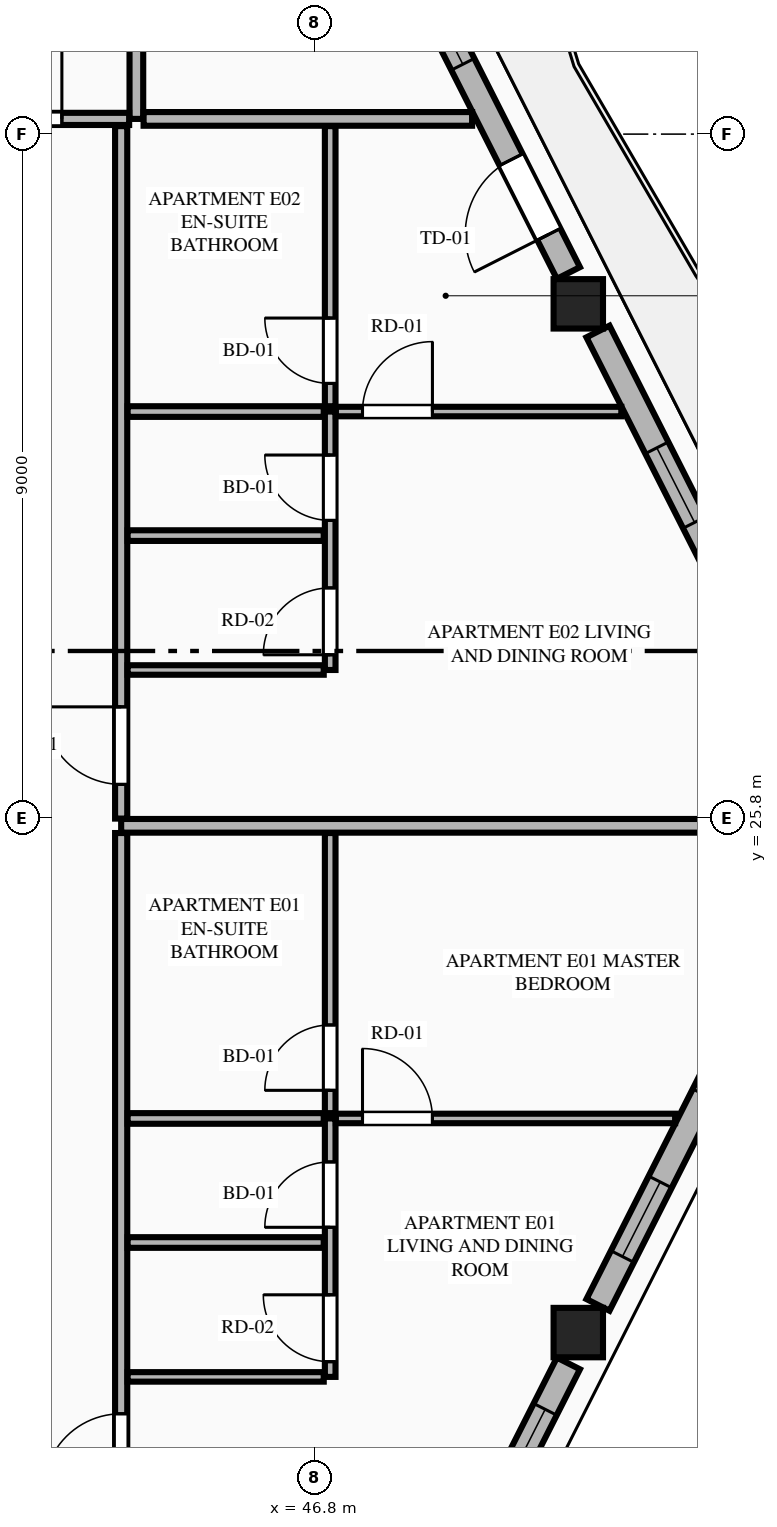
"""IFC4 building model, lengths in metres.
Left out: names, types, materials, properties, quantities, classifications, styles, units other than length and angle.
Written with IfcOpenShell. Run it as: python <this file> out.ifc"""

import sys

from ifc_helpers import new_model, si_unit, direction, frame, frame_2d, origin, origin_2d, place, context, subcontext, project, spatial, rectangle, extrude, element, fill, save


model = new_model("IFC4")
c1 = context("Model", 3, precision=1e-05, world=origin(), true_north=direction((0.0, 1.0)))
c2 = subcontext(c1, "Body", "Model", "MODEL_VIEW")
j1 = project(units=[si_unit("LENGTHUNIT", "METRE"), si_unit("PLANEANGLEUNIT", "RADIAN")], contexts=[c1])
p1 = place(None, origin())
s1 = spatial("IfcSite", under=j1, at=p1, CompositionType="ELEMENT")
p2 = place(p1, origin())
s2 = spatial("IfcBuilding", under=s1, at=p2, CompositionType="ELEMENT")
p3 = place(p2, frame((0.0, 0.0, 287.5)))
s3 = spatial("IfcBuildingStorey", under=s2, at=p3, CompositionType="ELEMENT", Elevation=287.5)
for number, where, z_axis, x_axis in (
    (1, (50.264, 19.033, 0.0), (0.0, 0.0, 1.0), (1.0, 0.0, 0.0)),
    (2, (50.264, 32.567, 0.0), (0.0, 0.0, 1.0), (1.0, 0.0, 0.0)),
):
    element("IfcColumn", number, at=place(p3, frame(where, z_axis=z_axis, x_axis=x_axis)), inside=s3, PredefinedType="COLUMN", context=c2, shape_type="SweptSolid", body=[
        extrude(rectangle(XDim=0.65, YDim=0.65, at=origin_2d()), origin(), (0.0, 0.0, 1.0), 4.0),
    ])
p4 = place(p3, frame((48.002, 14.413, 0.0), z_axis=(0.0, 0.0, 1.0), x_axis=(0.451468341582, 0.892287137949, 0.0)))
e3 = element("IfcWall", 3, at=p4, inside=s3, PredefinedType="STANDARD", context=c2, shape_type="SweptSolid", body=[
    extrude(rectangle(XDim=4.723, YDim=0.34, at=frame_2d((2.361, 0.0))), origin(), (0.0, 0.0, 1.0), 2.99),
])
p5 = place(p4, frame((0.434, 0.0, 0.75)))
e4 = element("IfcOpeningElement", 4, at=p5, cuts=e3, PredefinedType="OPENING", context=c2, shape_type="SweptSolid", body=[
    extrude(rectangle(XDim=1.1, YDim=2.0, at=frame_2d((0.55, 1.0))), frame((0.0, 0.18, 0.0), z_axis=(0.0, -1.0, 0.0), x_axis=(1.0, 0.0, 0.0)), (0.0, 0.0, 1.0), 0.36),
])
p6 = place(p4, frame((2.946, 0.0, 0.75)))
e5 = element("IfcOpeningElement", 5, at=p6, cuts=e3, PredefinedType="OPENING", context=c2, shape_type="SweptSolid", body=[
    extrude(rectangle(XDim=1.1, YDim=2.0, at=frame_2d((0.55, 1.0))), frame((0.0, 0.18, 0.0), z_axis=(0.0, -1.0, 0.0), x_axis=(1.0, 0.0, 0.0)), (0.0, 0.0, 1.0), 0.36),
])
p7 = place(p3, frame((50.523, 19.397, 0.0), z_axis=(0.0, 0.0, 1.0), x_axis=(0.45147697324, 0.892282770558, 0.0)))
e6 = element("IfcWall", 6, at=p7, inside=s3, PredefinedType="STANDARD", context=c2, shape_type="SweptSolid", body=[
    extrude(rectangle(XDim=4.53, YDim=0.34, at=frame_2d((2.265, 0.0))), origin(), (0.0, 0.0, 1.0), 2.99),
])
p8 = place(p7, frame((0.713, 0.0, 0.75)))
e7 = element("IfcOpeningElement", 7, at=p8, cuts=e6, PredefinedType="OPENING", context=c2, shape_type="SweptSolid", body=[
    extrude(rectangle(XDim=1.1, YDim=2.0, at=frame_2d((0.55, 1.0))), frame((0.0, 0.18, 0.0), z_axis=(0.0, -1.0, 0.0), x_axis=(1.0, 0.0, 0.0)), (0.0, 0.0, 1.0), 0.36),
])
p9 = place(p7, frame((3.098, 0.0, 0.75)))
e8 = element("IfcOpeningElement", 8, at=p9, cuts=e6, PredefinedType="OPENING", context=c2, shape_type="SweptSolid", body=[
    extrude(rectangle(XDim=1.1, YDim=2.0, at=frame_2d((0.55, 1.0))), frame((0.0, 0.18, 0.0), z_axis=(0.0, -1.0, 0.0), x_axis=(1.0, 0.0, 0.0)), (0.0, 0.0, 1.0), 0.36),
])
p10 = place(p3, frame((52.568, 28.161, 0.0), z_axis=(0.0, 0.0, 1.0), x_axis=(-0.45147697324, 0.892282770558, 0.0)))
e9 = element("IfcWall", 9, at=p10, inside=s3, PredefinedType="STANDARD", context=c2, shape_type="SweptSolid", body=[
    extrude(rectangle(XDim=4.53, YDim=0.34, at=frame_2d((2.265, 0.0))), origin(), (0.0, 0.0, 1.0), 2.99),
])
p11 = place(p10, frame((1.715, 0.0, 0.75)))
e10 = element("IfcOpeningElement", 10, at=p11, cuts=e9, PredefinedType="OPENING", context=c2, shape_type="SweptSolid", body=[
    extrude(rectangle(XDim=1.1, YDim=2.0, at=frame_2d((0.55, 1.0))), frame((0.0, 0.18, 0.0), z_axis=(0.0, -1.0, 0.0), x_axis=(1.0, 0.0, 0.0)), (0.0, 0.0, 1.0), 0.36),
])
p12 = place(p3, frame((50.134, 32.973, 0.0), z_axis=(0.0, 0.0, 1.0), x_axis=(-0.451447516904, 0.892297674255, 0.0)))
e11 = element("IfcWall", 11, at=p12, inside=s3, PredefinedType="STANDARD", context=c2, shape_type="SweptSolid", body=[
    extrude(rectangle(XDim=4.723, YDim=0.34, at=frame_2d((2.361, 0.0))), origin(), (0.0, 0.0, 1.0), 2.99),
])
p13 = place(p12, frame((0.57, 0.0, 0.0)))
e12 = element("IfcOpeningElement", 12, at=p13, cuts=e11, PredefinedType="OPENING", context=c2, shape_type="SweptSolid", body=[
    extrude(rectangle(XDim=1.1, YDim=2.25, at=frame_2d((0.55, 1.125))), frame((0.0, 0.18, 0.0), z_axis=(0.0, -1.0, 0.0), x_axis=(1.0, 0.0, 0.0)), (0.0, 0.0, 1.0), 0.36),
])
p14 = place(p12, frame((3.077, 0.0, 0.75)))
e13 = element("IfcOpeningElement", 13, at=p14, cuts=e11, PredefinedType="OPENING", context=c2, shape_type="SweptSolid", body=[
    extrude(rectangle(XDim=1.1, YDim=2.0, at=frame_2d((0.55, 1.0))), frame((0.0, 0.18, 0.0), z_axis=(0.0, -1.0, 0.0), x_axis=(1.0, 0.0, 0.0)), (0.0, 0.0, 1.0), 0.36),
])
p15 = place(p3, frame((44.45, 35.0, 0.0), z_axis=(0.0, 0.0, 1.0), x_axis=(0.0, 1.0, 0.0)))
e14 = element("IfcWall", 14, at=p15, inside=s3, PredefinedType="PARTITIONING", context=c2, shape_type="SweptSolid", body=[
    extrude(rectangle(XDim=8.481, YDim=0.18, at=frame_2d((4.24, 0.0))), origin(), (0.0, 0.0, 1.0), 3.8),
])
p16 = place(p3, frame((29.241, 35.0, 0.0), z_axis=(0.0, 0.0, 1.0), x_axis=(1.0, 0.0, 0.0)))
e15 = element("IfcWall", 15, at=p16, inside=s3, PredefinedType="PARTITIONING", context=c2, shape_type="SweptSolid", body=[
    extrude(rectangle(XDim=15.114, YDim=0.16, at=frame_2d((7.557, 0.0))), origin(), (0.0, 0.0, 1.0), 3.8),
])
p17 = place(p16, frame((13.209, 0.0, 0.0)))
e16 = element("IfcOpeningElement", 16, at=p17, cuts=e15, PredefinedType="OPENING", context=c2, shape_type="SweptSolid", body=[
    extrude(rectangle(XDim=1.02, YDim=2.25, at=frame_2d((0.51, 1.125))), frame((0.0, 0.09, 0.0), z_axis=(0.0, -1.0, 0.0), x_axis=(1.0, 0.0, 0.0)), (0.0, 0.0, 1.0), 0.18),
])
p18 = place(p3, frame((44.545, 35.0, 0.0), z_axis=(0.0, 0.0, 1.0), x_axis=(1.0, 0.0, 0.0)))
e17 = element("IfcWall", 17, at=p18, inside=s3, PredefinedType="PARTITIONING", context=c2, shape_type="SweptSolid", body=[
    extrude(rectangle(XDim=4.322, YDim=0.18, at=frame_2d((2.161, 0.0))), origin(), (0.0, 0.0, 1.0), 3.8),
])
p19 = place(p3, frame((44.25, 16.495, 0.0), z_axis=(0.0, 0.0, 1.0), x_axis=(0.0, 1.0, 0.0)))
e18 = element("IfcWall", 18, at=p19, inside=s3, PredefinedType="PARTITIONING", context=c2, shape_type="SweptSolid", body=[
    extrude(rectangle(XDim=9.11, YDim=0.16, at=frame_2d((4.555, 0.0))), origin(), (0.0, 0.0, 1.0), 3.487),
])
p20 = place(p19, frame((0.45, 0.0, 0.0)))
e19 = element("IfcOpeningElement", 19, at=p20, cuts=e18, PredefinedType="OPENING", context=c2, shape_type="SweptSolid", body=[
    extrude(rectangle(XDim=1.02, YDim=2.25, at=frame_2d((0.51, 1.125))), frame((0.0, 0.09, 0.0), z_axis=(0.0, -1.0, 0.0), x_axis=(1.0, 0.0, 0.0)), (0.0, 0.0, 1.0), 0.18),
])
p21 = place(p3, frame((44.335, 18.45, 0.0), z_axis=(0.0, 0.0, 1.0), x_axis=(1.0, 0.0, 0.0)))
e20 = element("IfcWall", 20, at=p21, inside=s3, PredefinedType="PARTITIONING", context=c2, shape_type="SweptSolid", body=[
    extrude(rectangle(XDim=2.58, YDim=0.125, at=frame_2d((1.29, 0.0))), origin(), (0.0, 0.0, 1.0), 3.8),
])
p22 = place(p3, frame((47.0, 18.45, 0.0), z_axis=(0.0, 0.0, 1.0), x_axis=(0.0, 1.0, 0.0)))
e21 = element("IfcWall", 21, at=p22, inside=s3, PredefinedType="PLUMBINGWALL", context=c2, shape_type="SweptSolid", body=[
    extrude(rectangle(XDim=3.4, YDim=0.14, at=frame_2d((1.7, 0.0))), origin(), (0.0, 0.0, 1.0), 3.8),
])
p23 = place(p22, frame((0.2, 0.0, 0.0)))
e22 = element("IfcOpeningElement", 22, at=p23, cuts=e21, PredefinedType="OPENING", context=c2, shape_type="SweptSolid", body=[
    extrude(rectangle(XDim=0.88, YDim=2.15, at=frame_2d((0.44, 1.075))), frame((0.0, 0.08, 0.0), z_axis=(0.0, -1.0, 0.0), x_axis=(1.0, 0.0, 0.0)), (0.0, 0.0, 1.0), 0.16),
])
p24 = place(p22, frame((1.968, 0.0, 0.0)))
e23 = element("IfcOpeningElement", 23, at=p24, cuts=e21, PredefinedType="OPENING", context=c2, shape_type="SweptSolid", body=[
    extrude(rectangle(XDim=0.86, YDim=2.1, at=frame_2d((0.43, 1.05))), frame((0.0, 0.08, 0.0), z_axis=(0.0, -1.0, 0.0), x_axis=(1.0, 0.0, 0.0)), (0.0, 0.0, 1.0), 0.16),
])
p25 = place(p3, frame((47.0, 21.92, 0.0), z_axis=(0.0, 0.0, 1.0), x_axis=(0.0, 1.0, 0.0)))
e24 = element("IfcWall", 24, at=p25, inside=s3, PredefinedType="PLUMBINGWALL", context=c2, shape_type="SweptSolid", body=[
    extrude(rectangle(XDim=3.685, YDim=0.14, at=frame_2d((1.843, 0.0))), origin(), (0.0, 0.0, 1.0), 3.8),
])
p26 = place(p25, frame((0.3, 0.0, 0.0)))
e25 = element("IfcOpeningElement", 25, at=p26, cuts=e24, PredefinedType="OPENING", context=c2, shape_type="SweptSolid", body=[
    extrude(rectangle(XDim=0.86, YDim=2.1, at=frame_2d((0.43, 1.05))), frame((0.0, 0.08, 0.0), z_axis=(0.0, -1.0, 0.0), x_axis=(1.0, 0.0, 0.0)), (0.0, 0.0, 1.0), 0.16),
])
p27 = place(p3, frame((44.335, 21.85, 0.0), z_axis=(0.0, 0.0, 1.0), x_axis=(1.0, 0.0, 0.0)))
e26 = element("IfcWall", 26, at=p27, inside=s3, PredefinedType="PLUMBINGWALL", context=c2, shape_type="SweptSolid", body=[
    extrude(rectangle(XDim=2.58, YDim=0.14, at=frame_2d((1.29, 0.0))), origin(), (0.0, 0.0, 1.0), 3.8),
])
p28 = place(p3, frame((47.075, 21.85, 0.0), z_axis=(0.0, 0.0, 1.0), x_axis=(1.0, 0.0, 0.0)))
e27 = element("IfcWall", 27, at=p28, inside=s3, PredefinedType="PARTITIONING", context=c2, shape_type="SweptSolid", body=[
    extrude(rectangle(XDim=4.463, YDim=0.125, at=frame_2d((2.231, 0.0))), origin(), (0.0, 0.0, 1.0), 3.8),
])
p29 = place(p28, frame((0.35, 0.0, 0.0)))
e28 = element("IfcOpeningElement", 28, at=p29, cuts=e27, PredefinedType="OPENING", context=c2, shape_type="SweptSolid", body=[
    extrude(rectangle(XDim=0.92, YDim=2.15, at=frame_2d((0.46, 1.075))), frame((0.0, 0.073, 0.0), z_axis=(0.0, -1.0, 0.0), x_axis=(1.0, 0.0, 0.0)), (0.0, 0.0, 1.0), 0.145),
])
p30 = place(p3, frame((44.335, 20.218, 0.0), z_axis=(0.0, 0.0, 1.0), x_axis=(1.0, 0.0, 0.0)))
e29 = element("IfcWall", 29, at=p30, inside=s3, PredefinedType="PLUMBINGWALL", context=c2, shape_type="SweptSolid", body=[
    extrude(rectangle(XDim=2.58, YDim=0.14, at=frame_2d((1.29, 0.0))), origin(), (0.0, 0.0, 1.0), 3.8),
])
p31 = place(p3, frame((44.25, 25.7, 0.0), z_axis=(0.0, 0.0, 1.0), x_axis=(1.0, 0.0, 0.0)))
e30 = element("IfcWall", 30, at=p31, inside=s3, PredefinedType="PARTITIONING", context=c2, shape_type="SweptSolid", body=[
    extrude(rectangle(XDim=8.898, YDim=0.18, at=frame_2d((4.449, 0.0))), origin(), (0.0, 0.0, 1.0), 3.8),
])
p32 = place(p3, frame((44.25, 25.795, 0.0), z_axis=(0.0, 0.0, 1.0), x_axis=(0.0, 1.0, 0.0)))
e31 = element("IfcWall", 31, at=p32, inside=s3, PredefinedType="PARTITIONING", context=c2, shape_type="SweptSolid", body=[
    extrude(rectangle(XDim=9.11, YDim=0.16, at=frame_2d((4.555, 0.0))), origin(), (0.0, 0.0, 1.0), 3.487),
])
p33 = place(p32, frame((0.45, 0.0, 0.0)))
e32 = element("IfcOpeningElement", 32, at=p33, cuts=e31, PredefinedType="OPENING", context=c2, shape_type="SweptSolid", body=[
    extrude(rectangle(XDim=1.02, YDim=2.25, at=frame_2d((0.51, 1.125))), frame((0.0, 0.09, 0.0), z_axis=(0.0, -1.0, 0.0), x_axis=(1.0, 0.0, 0.0)), (0.0, 0.0, 1.0), 0.18),
])
p34 = place(p3, frame((44.335, 27.75, 0.0), z_axis=(0.0, 0.0, 1.0), x_axis=(1.0, 0.0, 0.0)))
e33 = element("IfcWall", 33, at=p34, inside=s3, PredefinedType="PARTITIONING", context=c2, shape_type="SweptSolid", body=[
    extrude(rectangle(XDim=2.58, YDim=0.125, at=frame_2d((1.29, 0.0))), origin(), (0.0, 0.0, 1.0), 3.257),
])
p35 = place(p3, frame((47.0, 27.75, 0.0), z_axis=(0.0, 0.0, 1.0), x_axis=(0.0, 1.0, 0.0)))
e34 = element("IfcWall", 34, at=p35, inside=s3, PredefinedType="PLUMBINGWALL", context=c2, shape_type="SweptSolid", body=[
    extrude(rectangle(XDim=3.4, YDim=0.14, at=frame_2d((1.7, 0.0))), origin(), (0.0, 0.0, 1.0), 3.8),
])
p36 = place(p35, frame((0.2, 0.0, 0.0)))
e35 = element("IfcOpeningElement", 35, at=p36, cuts=e34, PredefinedType="OPENING", context=c2, shape_type="SweptSolid", body=[
    extrude(rectangle(XDim=0.88, YDim=2.15, at=frame_2d((0.44, 1.075))), frame((0.0, 0.08, 0.0), z_axis=(0.0, -1.0, 0.0), x_axis=(1.0, 0.0, 0.0)), (0.0, 0.0, 1.0), 0.16),
])
p37 = place(p35, frame((1.968, 0.0, 0.0)))
e36 = element("IfcOpeningElement", 36, at=p37, cuts=e34, PredefinedType="OPENING", context=c2, shape_type="SweptSolid", body=[
    extrude(rectangle(XDim=0.86, YDim=2.1, at=frame_2d((0.43, 1.05))), frame((0.0, 0.08, 0.0), z_axis=(0.0, -1.0, 0.0), x_axis=(1.0, 0.0, 0.0)), (0.0, 0.0, 1.0), 0.16),
])
p38 = place(p3, frame((47.0, 31.22, 0.0), z_axis=(0.0, 0.0, 1.0), x_axis=(0.0, 1.0, 0.0)))
e37 = element("IfcWall", 37, at=p38, inside=s3, PredefinedType="PLUMBINGWALL", context=c2, shape_type="SweptSolid", body=[
    extrude(rectangle(XDim=3.685, YDim=0.14, at=frame_2d((1.843, 0.0))), origin(), (0.0, 0.0, 1.0), 3.8),
])
p39 = place(p38, frame((0.3, 0.0, 0.0)))
e38 = element("IfcOpeningElement", 38, at=p39, cuts=e37, PredefinedType="OPENING", context=c2, shape_type="SweptSolid", body=[
    extrude(rectangle(XDim=0.86, YDim=2.1, at=frame_2d((0.43, 1.05))), frame((0.0, 0.08, 0.0), z_axis=(0.0, -1.0, 0.0), x_axis=(1.0, 0.0, 0.0)), (0.0, 0.0, 1.0), 0.16),
])
p40 = place(p3, frame((44.335, 31.15, 0.0), z_axis=(0.0, 0.0, 1.0), x_axis=(1.0, 0.0, 0.0)))
e39 = element("IfcWall", 39, at=p40, inside=s3, PredefinedType="PLUMBINGWALL", context=c2, shape_type="SweptSolid", body=[
    extrude(rectangle(XDim=2.58, YDim=0.14, at=frame_2d((1.29, 0.0))), origin(), (0.0, 0.0, 1.0), 3.8),
])
p41 = place(p3, frame((47.075, 31.15, 0.0), z_axis=(0.0, 0.0, 1.0), x_axis=(1.0, 0.0, 0.0)))
e40 = element("IfcWall", 40, at=p41, inside=s3, PredefinedType="PARTITIONING", context=c2, shape_type="SweptSolid", body=[
    extrude(rectangle(XDim=3.755, YDim=0.125, at=frame_2d((1.877, 0.0))), origin(), (0.0, 0.0, 1.0), 3.8),
])
p42 = place(p41, frame((0.35, 0.0, 0.0)))
e41 = element("IfcOpeningElement", 41, at=p42, cuts=e40, PredefinedType="OPENING", context=c2, shape_type="SweptSolid", body=[
    extrude(rectangle(XDim=0.92, YDim=2.15, at=frame_2d((0.46, 1.075))), frame((0.0, 0.073, 0.0), z_axis=(0.0, -1.0, 0.0), x_axis=(1.0, 0.0, 0.0)), (0.0, 0.0, 1.0), 0.145),
])
p43 = place(p3, frame((44.335, 29.518, 0.0), z_axis=(0.0, 0.0, 1.0), x_axis=(1.0, 0.0, 0.0)))
e42 = element("IfcWall", 42, at=p43, inside=s3, PredefinedType="PLUMBINGWALL", context=c2, shape_type="SweptSolid", body=[
    extrude(rectangle(XDim=2.58, YDim=0.14, at=frame_2d((1.29, 0.0))), origin(), (0.0, 0.0, 1.0), 3.8),
])
p44 = place(p8, origin())
e43 = element("IfcWindow", 43, at=p44, inside=s3, PartitioningType="SINGLE_PANEL", PredefinedType="WINDOW", context=c2, shape_type="SweptSolid", body=[
    extrude(rectangle(XDim=1.1, YDim=2.0, at=frame_2d((0.55, 1.0))), frame((0.0, 0.03, 0.0), z_axis=(0.0, -1.0, 0.0), x_axis=(1.0, 0.0, 0.0)), (0.0, 0.0, 1.0), 0.06),
])
fill(e7, e43)
p45 = place(p11, origin())
e44 = element("IfcWindow", 44, at=p45, inside=s3, PartitioningType="SINGLE_PANEL", PredefinedType="WINDOW", context=c2, shape_type="SweptSolid", body=[
    extrude(rectangle(XDim=1.1, YDim=2.0, at=frame_2d((0.55, 1.0))), frame((0.0, 0.03, 0.0), z_axis=(0.0, -1.0, 0.0), x_axis=(1.0, 0.0, 0.0)), (0.0, 0.0, 1.0), 0.06),
])
fill(e10, e44)
p46 = place(p13, origin())
e45 = element("IfcDoor", 45, at=p46, inside=s3, OperationType="SINGLE_SWING_LEFT", PredefinedType="DOOR", context=c2, shape_type="SweptSolid", body=[
    extrude(rectangle(XDim=1.1, YDim=2.25, at=frame_2d((0.55, 1.125))), frame((0.0, 0.025, 0.0), z_axis=(0.0, -1.0, 0.0), x_axis=(1.0, 0.0, 0.0)), (0.0, 0.0, 1.0), 0.05),
])
fill(e12, e45)
p47 = place(p17, origin())
e46 = element("IfcDoor", 46, at=p47, inside=s3, OperationType="SINGLE_SWING_RIGHT", PredefinedType="DOOR", context=c2, shape_type="SweptSolid", body=[
    extrude(rectangle(XDim=1.02, YDim=2.25, at=frame_2d((0.51, 1.125))), frame((0.0, 0.025, 0.0), z_axis=(0.0, -1.0, 0.0), x_axis=(1.0, 0.0, 0.0)), (0.0, 0.0, 1.0), 0.05),
])
fill(e16, e46)
p48 = place(p23, origin())
e47 = element("IfcDoor", 47, at=p48, inside=s3, OperationType="SINGLE_SWING_RIGHT", PredefinedType="DOOR", context=c2, shape_type="SweptSolid", body=[
    extrude(rectangle(XDim=0.88, YDim=2.15, at=frame_2d((0.44, 1.075))), frame((0.0, 0.025, 0.0), z_axis=(0.0, -1.0, 0.0), x_axis=(1.0, 0.0, 0.0)), (0.0, 0.0, 1.0), 0.05),
])
fill(e22, e47)
p49 = place(p24, origin())
e48 = element("IfcDoor", 48, at=p49, inside=s3, OperationType="SINGLE_SWING_LEFT", PredefinedType="DOOR", context=c2, shape_type="SweptSolid", body=[
    extrude(rectangle(XDim=0.86, YDim=2.1, at=frame_2d((0.43, 1.05))), frame((0.0, 0.025, 0.0), z_axis=(0.0, -1.0, 0.0), x_axis=(1.0, 0.0, 0.0)), (0.0, 0.0, 1.0), 0.05),
])
fill(e23, e48)
p50 = place(p26, origin())
e49 = element("IfcDoor", 49, at=p50, inside=s3, OperationType="SINGLE_SWING_LEFT", PredefinedType="DOOR", context=c2, shape_type="SweptSolid", body=[
    extrude(rectangle(XDim=0.86, YDim=2.1, at=frame_2d((0.43, 1.05))), frame((0.0, 0.025, 0.0), z_axis=(0.0, -1.0, 0.0), x_axis=(1.0, 0.0, 0.0)), (0.0, 0.0, 1.0), 0.05),
])
fill(e25, e49)
p51 = place(p20, origin())
e50 = element("IfcDoor", 50, at=p51, inside=s3, OperationType="SINGLE_SWING_LEFT", PredefinedType="DOOR", context=c2, shape_type="SweptSolid", body=[
    extrude(rectangle(XDim=1.02, YDim=2.25, at=frame_2d((0.51, 1.125))), frame((0.0, 0.025, 0.0), z_axis=(0.0, -1.0, 0.0), x_axis=(1.0, 0.0, 0.0)), (0.0, 0.0, 1.0), 0.05),
])
fill(e19, e50)
p52 = place(p29, origin())
e51 = element("IfcDoor", 51, at=p52, inside=s3, OperationType="SINGLE_SWING_LEFT", PredefinedType="DOOR", context=c2, shape_type="SweptSolid", body=[
    extrude(rectangle(XDim=0.92, YDim=2.15, at=frame_2d((0.46, 1.075))), frame((0.0, 0.025, 0.0), z_axis=(0.0, -1.0, 0.0), x_axis=(1.0, 0.0, 0.0)), (0.0, 0.0, 1.0), 0.05),
])
fill(e28, e51)
p53 = place(p36, origin())
e52 = element("IfcDoor", 52, at=p53, inside=s3, OperationType="SINGLE_SWING_LEFT", PredefinedType="DOOR", context=c2, shape_type="SweptSolid", body=[
    extrude(rectangle(XDim=0.88, YDim=2.15, at=frame_2d((0.44, 1.075))), frame((0.0, 0.025, 0.0), z_axis=(0.0, -1.0, 0.0), x_axis=(1.0, 0.0, 0.0)), (0.0, 0.0, 1.0), 0.05),
])
fill(e35, e52)
p54 = place(p37, origin())
e53 = element("IfcDoor", 53, at=p54, inside=s3, OperationType="SINGLE_SWING_RIGHT", PredefinedType="DOOR", context=c2, shape_type="SweptSolid", body=[
    extrude(rectangle(XDim=0.86, YDim=2.1, at=frame_2d((0.43, 1.05))), frame((0.0, 0.025, 0.0), z_axis=(0.0, -1.0, 0.0), x_axis=(1.0, 0.0, 0.0)), (0.0, 0.0, 1.0), 0.05),
])
fill(e36, e53)
p55 = place(p39, origin())
e54 = element("IfcDoor", 54, at=p55, inside=s3, OperationType="SINGLE_SWING_RIGHT", PredefinedType="DOOR", context=c2, shape_type="SweptSolid", body=[
    extrude(rectangle(XDim=0.86, YDim=2.1, at=frame_2d((0.43, 1.05))), frame((0.0, 0.025, 0.0), z_axis=(0.0, -1.0, 0.0), x_axis=(1.0, 0.0, 0.0)), (0.0, 0.0, 1.0), 0.05),
])
fill(e38, e54)
p56 = place(p33, origin())
e55 = element("IfcDoor", 55, at=p56, inside=s3, OperationType="SINGLE_SWING_RIGHT", PredefinedType="DOOR", context=c2, shape_type="SweptSolid", body=[
    extrude(rectangle(XDim=1.02, YDim=2.25, at=frame_2d((0.51, 1.125))), frame((0.0, 0.025, 0.0), z_axis=(0.0, -1.0, 0.0), x_axis=(1.0, 0.0, 0.0)), (0.0, 0.0, 1.0), 0.05),
])
fill(e32, e55)
p57 = place(p42, origin())
e56 = element("IfcDoor", 56, at=p57, inside=s3, OperationType="SINGLE_SWING_RIGHT", PredefinedType="DOOR", context=c2, shape_type="SweptSolid", body=[
    extrude(rectangle(XDim=0.92, YDim=2.15, at=frame_2d((0.46, 1.075))), frame((0.0, 0.025, 0.0), z_axis=(0.0, -1.0, 0.0), x_axis=(1.0, 0.0, 0.0)), (0.0, 0.0, 1.0), 0.05),
])
fill(e41, e56)
p58 = place(p6, origin())
e57 = element("IfcWindow", 57, at=p58, inside=s3, PartitioningType="SINGLE_PANEL", PredefinedType="WINDOW", context=c2, shape_type="SweptSolid", body=[
    extrude(rectangle(XDim=1.1, YDim=2.0, at=frame_2d((0.55, 1.0))), frame((0.0, 0.03, 0.0), z_axis=(0.0, -1.0, 0.0), x_axis=(1.0, 0.0, 0.0)), (0.0, 0.0, 1.0), 0.06),
])
fill(e5, e57)
p59 = place(p14, origin())
e58 = element("IfcWindow", 58, at=p59, inside=s3, PartitioningType="SINGLE_PANEL", PredefinedType="WINDOW", context=c2, shape_type="SweptSolid", body=[
    extrude(rectangle(XDim=1.1, YDim=2.0, at=frame_2d((0.55, 1.0))), frame((0.0, 0.03, 0.0), z_axis=(0.0, -1.0, 0.0), x_axis=(1.0, 0.0, 0.0)), (0.0, 0.0, 1.0), 0.06),
])
fill(e13, e58)
save(model, sys.argv[1])
